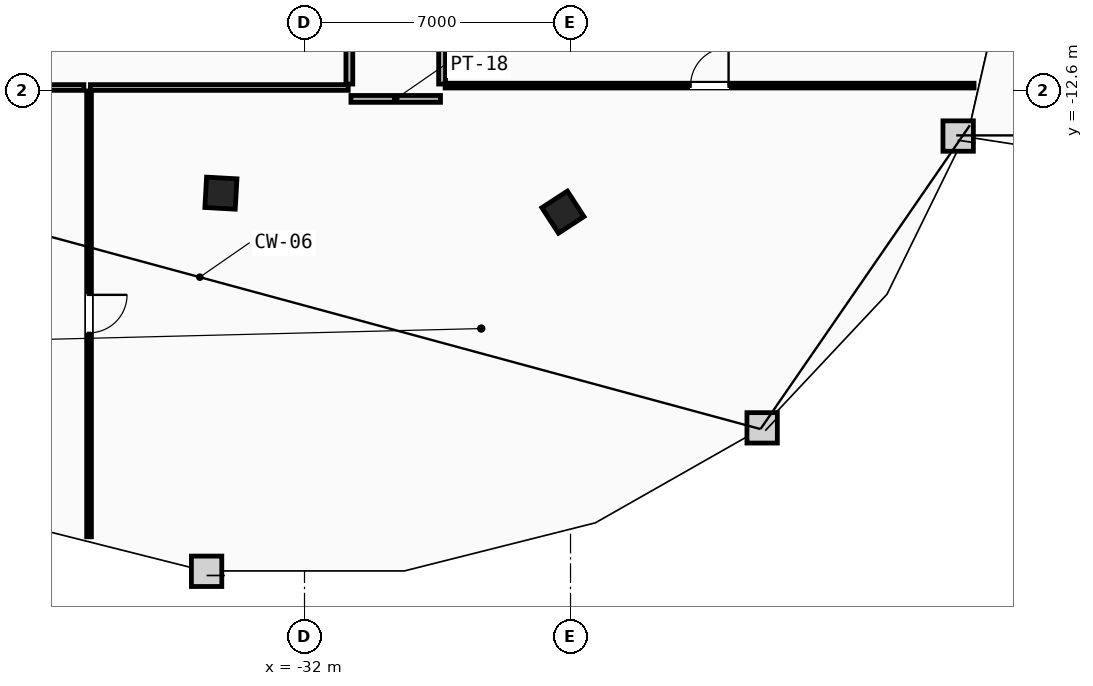
"""IFC4 building model, lengths in metres.
Left out: names, types, materials, properties, quantities, classifications, styles, units other than length and angle.
Written with IfcOpenShell. Run it as: python <this file> out.ifc"""

import sys

from ifc_helpers import new_model, si_unit, direction, frame, frame_2d, origin, origin_2d, place, context, subcontext, project, spatial, rectangle, extrude, element, fill, save


model = new_model("IFC4")
c1 = context("Model", 3, precision=1e-05, world=origin(), true_north=direction((0.0, 1.0)))
c2 = subcontext(c1, "Body", "Model", "MODEL_VIEW")
j1 = project(units=[si_unit("LENGTHUNIT", "METRE"), si_unit("PLANEANGLEUNIT", "RADIAN")], contexts=[c1])
p1 = place(None, origin())
s1 = spatial("IfcSite", under=j1, at=p1, CompositionType="ELEMENT")
p2 = place(p1, origin())
s2 = spatial("IfcBuilding", under=s1, at=p2, CompositionType="ELEMENT")
p3 = place(p2, frame((0.0, 0.0, 243.2)))
s3 = spatial("IfcBuildingStorey", under=s2, at=p3, CompositionType="ELEMENT", Elevation=243.2)
for number, where, z_axis, x_axis in (
    (1, (-34.2, -15.3, 0.0), (0.0, 0.0, 1.0), (0.998, -0.055, 0.0)),
    (2, (-25.2, -15.8, 0.0), (0.0, 0.0, 1.0), (0.838, 0.546, 0.0)),
):
    element("IfcColumn", number, at=place(p3, frame(where, z_axis=z_axis, x_axis=x_axis)), inside=s3, PredefinedType="COLUMN", context=c2, shape_type="SweptSolid", body=[
        extrude(rectangle(XDim=0.8, YDim=0.8, at=origin_2d()), origin(), (0.0, 0.0, 1.0), 3.6),
    ])
p4 = place(p3, frame((-49.686, -12.52, 0.0), z_axis=(0.0, 0.0, 1.0), x_axis=(1.0, 0.0, 0.0)))
e3 = element("IfcWall", 3, at=p4, inside=s3, PredefinedType="PARTITIONING", context=c2, shape_type="SweptSolid", body=[
    extrude(rectangle(XDim=11.881, YDim=0.15, at=frame_2d((5.94, 0.0))), origin(), (0.0, 0.0, 1.0), 3.34),
])
p5 = place(p3, frame((-37.635, -12.52, 0.0), z_axis=(0.0, 0.0, 1.0), x_axis=(1.0, 0.0, 0.0)))
e4 = element("IfcWall", 4, at=p5, inside=s3, PredefinedType="PARTITIONING", context=c2, shape_type="SweptSolid", body=[
    extrude(rectangle(XDim=6.785, YDim=0.15, at=frame_2d((3.393, 0.0))), origin(), (0.0, 0.0, 1.0), 3.34),
])
p6 = place(p3, frame((-30.779, -12.82, 0.0), z_axis=(0.0, 0.0, 1.0), x_axis=(1.0, 0.0, 0.0)))
e5 = element("IfcWall", 5, at=p6, inside=s3, PredefinedType="PARTITIONING", context=c2, shape_type="SweptSolid", body=[
    extrude(rectangle(XDim=2.357, YDim=0.18, at=frame_2d((1.179, 0.0))), origin(), (0.0, 0.0, 1.0), 3.34),
])
p7 = place(p3, frame((-30.82, -6.07, 0.0), z_axis=(0.0, 0.0, 1.0), x_axis=(0.0, -1.0, 0.0)))
e6 = element("IfcWall", 6, at=p7, inside=s3, PredefinedType="PARTITIONING", context=c2, shape_type="SweptSolid", body=[
    extrude(rectangle(XDim=6.36, YDim=0.18, at=frame_2d((3.18, 0.0))), origin(), (0.0, 0.0, 1.0), 3.34),
])
p8 = place(p7, frame((2.68, 0.0, 0.0)))
e7 = element("IfcOpeningElement", 7, at=p8, cuts=e6, PredefinedType="OPENING", context=c2, shape_type="SweptSolid", body=[
    extrude(rectangle(XDim=1.0, YDim=2.15, at=frame_2d((0.5, 1.075))), frame((0.0, 0.1, 0.0), z_axis=(0.0, -1.0, 0.0), x_axis=(1.0, 0.0, 0.0)), (0.0, 0.0, 1.0), 0.2),
])
p9 = place(p3, frame((-28.38, -12.43, 0.0), z_axis=(0.0, 0.0, 1.0), x_axis=(0.0, 1.0, 0.0)))
e8 = element("IfcWall", 8, at=p9, inside=s3, PredefinedType="PARTITIONING", context=c2, shape_type="SweptSolid", body=[
    extrude(rectangle(XDim=6.36, YDim=0.18, at=frame_2d((3.18, 0.0))), origin(), (0.0, 0.0, 1.0), 3.34),
])
p10 = place(p9, frame((2.68, 0.0, 0.0)))
e9 = element("IfcOpeningElement", 9, at=p10, cuts=e8, PredefinedType="OPENING", context=c2, shape_type="SweptSolid", body=[
    extrude(rectangle(XDim=1.0, YDim=2.15, at=frame_2d((0.5, 1.075))), frame((0.0, 0.1, 0.0), z_axis=(0.0, -1.0, 0.0), x_axis=(1.0, 0.0, 0.0)), (0.0, 0.0, 1.0), 0.2),
])
p11 = place(p3, frame((-28.3, -12.47, 0.0), z_axis=(0.0, 0.0, 1.0), x_axis=(1.0, 0.0, 0.0)))
e10 = element("IfcWall", 10, at=p11, inside=s3, PredefinedType="PARTITIONING", context=c2, shape_type="SweptSolid", body=[
    extrude(rectangle(XDim=13.919, YDim=0.125, at=frame_2d((6.959, 0.0))), origin(), (0.0, 0.0, 1.0), 3.34),
])
p12 = place(p11, frame((6.459, 0.0, 0.0)))
e11 = element("IfcOpeningElement", 11, at=p12, cuts=e10, PredefinedType="OPENING", context=c2, shape_type="SweptSolid", body=[
    extrude(rectangle(XDim=1.0, YDim=2.15, at=frame_2d((0.5, 1.075))), frame((0.0, 0.073, 0.0), z_axis=(0.0, -1.0, 0.0), x_axis=(1.0, 0.0, 0.0)), (0.0, 0.0, 1.0), 0.145),
])
p13 = place(p3, frame((-37.67, -12.61, 0.0), z_axis=(0.0, 0.0, 1.0), x_axis=(0.0, -1.0, 0.0)))
e12 = element("IfcWall", 12, at=p13, inside=s3, PredefinedType="PARTITIONING", context=c2, shape_type="SweptSolid", body=[
    extrude(rectangle(XDim=11.731, YDim=0.125, at=frame_2d((5.866, 0.0))), origin(), (0.0, 0.0, 1.0), 3.34),
])
p14 = place(p13, frame((5.366, 0.0, 0.0)))
e13 = element("IfcOpeningElement", 13, at=p14, cuts=e12, PredefinedType="OPENING", context=c2, shape_type="SweptSolid", body=[
    extrude(rectangle(XDim=1.0, YDim=2.15, at=frame_2d((0.5, 1.075))), frame((0.0, 0.073, 0.0), z_axis=(0.0, -1.0, 0.0), x_axis=(1.0, 0.0, 0.0)), (0.0, 0.0, 1.0), 0.145),
])
p15 = place(p12, origin())
e14 = element("IfcDoor", 14, at=p15, inside=s3, OperationType="SINGLE_SWING_RIGHT", PredefinedType="DOOR", context=c2, shape_type="SweptSolid", body=[
    extrude(rectangle(XDim=1.0, YDim=2.15, at=frame_2d((0.5, 1.075))), frame((0.0, 0.025, 0.0), z_axis=(0.0, -1.0, 0.0), x_axis=(1.0, 0.0, 0.0)), (0.0, 0.0, 1.0), 0.05),
])
fill(e11, e14)
p16 = place(p14, origin())
e15 = element("IfcDoor", 15, at=p16, inside=s3, OperationType="SINGLE_SWING_LEFT", PredefinedType="DOOR", context=c2, shape_type="SweptSolid", body=[
    extrude(rectangle(XDim=1.0, YDim=2.15, at=frame_2d((0.5, 1.075))), frame((0.0, 0.025, 0.0), z_axis=(0.0, -1.0, 0.0), x_axis=(1.0, 0.0, 0.0)), (0.0, 0.0, 1.0), 0.05),
])
fill(e13, e15)
save(model, sys.argv[1])
